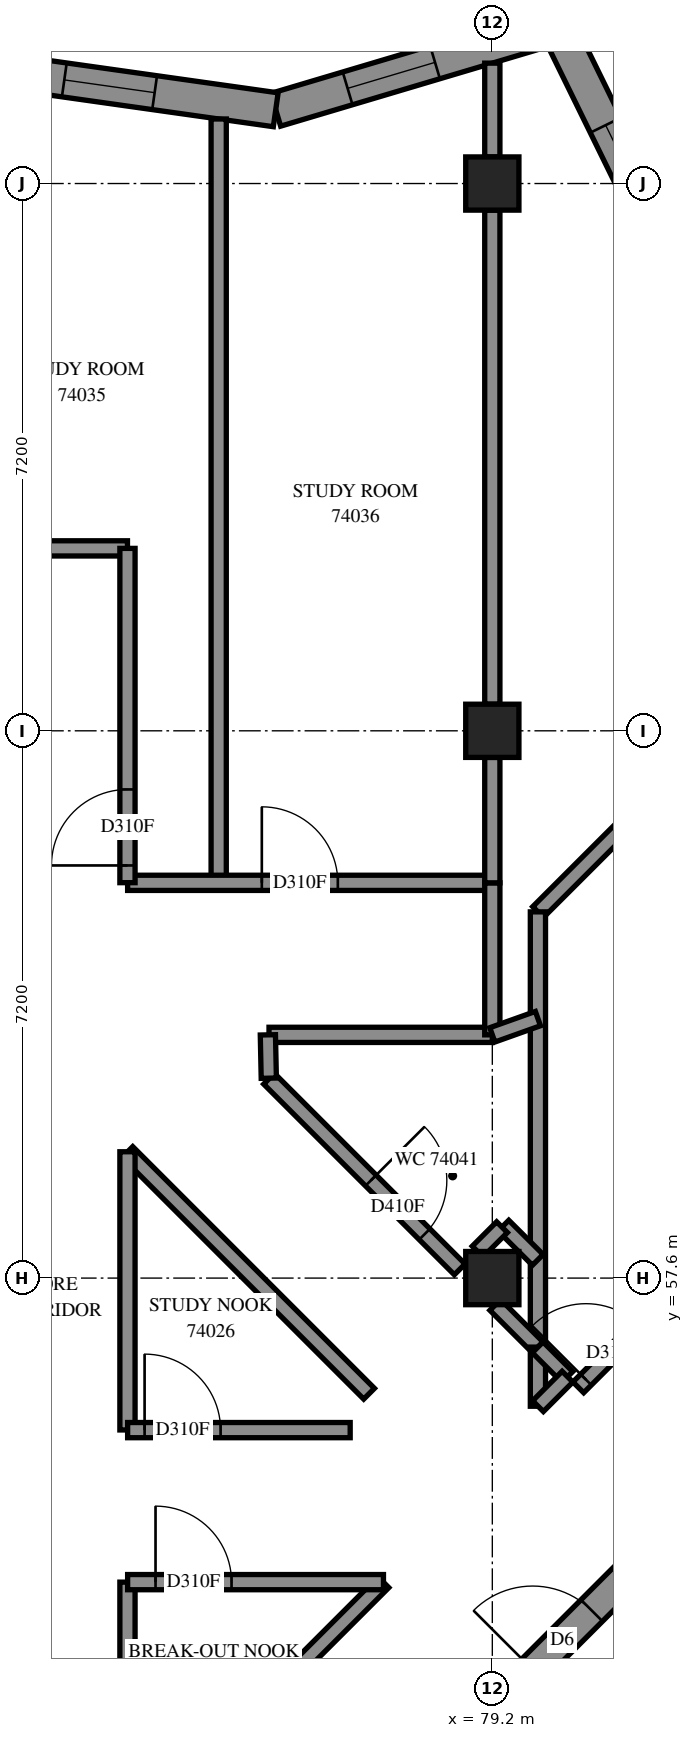
"""IFC4 building model, lengths in metres.
Left out: names, types, materials, properties, quantities, classifications, styles, units other than length and angle.
Written with IfcOpenShell. Run it as: python <this file> out.ifc"""

import sys

from ifc_helpers import new_model, si_unit, direction, frame, frame_2d, origin, origin_2d, place, context, subcontext, project, spatial, polyline, rectangle, outline, extrude, element, fill, save


model = new_model("IFC4")
c1 = context("Model", 3, precision=1e-05, world=origin(), true_north=direction((0.0, 1.0)))
c2 = subcontext(c1, "Body", "Model", "MODEL_VIEW")
j1 = project(units=[si_unit("LENGTHUNIT", "METRE"), si_unit("PLANEANGLEUNIT", "RADIAN")], contexts=[c1])
p1 = place(None, origin())
s1 = spatial("IfcSite", under=j1, at=p1, CompositionType="ELEMENT")
p2 = place(p1, origin())
s2 = spatial("IfcBuilding", under=s1, at=p2, CompositionType="ELEMENT")
p3 = place(p2, frame((0.0, 0.0, 271.0)))
s3 = spatial("IfcBuildingStorey", under=s2, at=p3, CompositionType="ELEMENT", Elevation=271.0)
for number, where, z_axis, x_axis in (
    (1, (79.2, 57.6, 0.0), (0.0, 0.0, 1.0), (1.0, 0.0, 0.0)),
    (2, (79.2, 64.8, 0.0), (0.0, 0.0, 1.0), (1.0, 0.0, 0.0)),
    (3, (79.2, 72.0, 0.0), (0.0, 0.0, 1.0), (1.0, 0.0, 0.0)),
):
    element("IfcColumn", number, at=place(p3, frame(where, z_axis=z_axis, x_axis=x_axis)), inside=s3, PredefinedType="COLUMN", context=c2, shape_type="SweptSolid", body=[
        extrude(rectangle(XDim=0.7, YDim=0.7, at=origin_2d()), origin(), (0.0, 0.0, 1.0), 3.1),
    ])
p4 = place(p3, frame((76.513, 49.231, -0.3), z_axis=(0.0, 0.0, 1.0), x_axis=(0.7071067812, 0.7071067812, 0.0)))
e4 = element("IfcWall", 4, at=p4, inside=s3, PredefinedType="SHEAR", context=c2, shape_type="SweptSolid", body=[
    extrude(rectangle(XDim=14.4, YDim=0.4, at=frame_2d((7.2, 0.0))), origin(), (0.0, 0.0, 1.0), 2.7),
])
p5 = place(p4, frame((4.55, 0.0, 0.3)))
e5 = element("IfcOpeningElement", 5, at=p5, cuts=e4, PredefinedType="OPENING", context=c2, shape_type="SweptSolid", body=[
    extrude(rectangle(XDim=1.1, YDim=2.1, at=frame_2d((0.55, 1.05))), frame((0.0, 0.21, 0.0), z_axis=(0.0, -1.0, 0.0), x_axis=(1.0, 0.0, 0.0)), (0.0, 0.0, 1.0), 0.42),
])
p6 = place(p4, frame((11.35, 0.0, 0.3)))
e6 = element("IfcOpeningElement", 6, at=p6, cuts=e4, PredefinedType="OPENING", context=c2, shape_type="SweptSolid", body=[
    extrude(rectangle(XDim=1.1, YDim=2.1, at=frame_2d((0.55, 1.05))), frame((0.0, 0.21, 0.0), z_axis=(0.0, -1.0, 0.0), x_axis=(1.0, 0.0, 0.0)), (0.0, 0.0, 1.0), 0.42),
])
p7 = place(p3, frame((81.545, 71.025, 0.0), z_axis=(0.0, 0.0, 1.0), x_axis=(-0.4400668213, 0.8979650287, 0.0)))
e7 = element("IfcWall", 7, at=p7, inside=s3, PredefinedType="SOLIDWALL", context=c2, shape_type="SweptSolid", body=[
    extrude(outline(polyline([(0.056, -0.225), (3.583, -0.225), (3.203, 0.225), (-0.056, 0.225), (0.056, -0.225)])), origin(), (0.0, 0.0, 1.0), 3.1),
])
p8 = place(p7, frame((0.741, 0.0, 0.45)))
e8 = element("IfcOpeningElement", 8, at=p8, cuts=e7, PredefinedType="OPENING", context=c2, shape_type="SweptSolid", body=[
    extrude(rectangle(XDim=1.2, YDim=2.55, at=frame_2d((0.6, 1.275))), frame((0.0, 0.235, 0.0), z_axis=(0.0, -1.0, 0.0), x_axis=(1.0, 0.0, 0.0)), (0.0, 0.0, 1.0), 0.47),
])
p9 = place(p3, frame((80.052, 74.072, 0.0), z_axis=(0.0, 0.0, 1.0), x_axis=(-0.9584412894, -0.2852898434, 0.0)))
e9 = element("IfcWall", 9, at=p9, inside=s3, PredefinedType="SOLIDWALL", context=c2, shape_type="SweptSolid", body=[
    extrude(outline(polyline([(-0.19, -0.225), (3.813, -0.225), (3.911, 0.225), (0.19, 0.225), (-0.19, -0.225)])), origin(), (0.0, 0.0, 1.0), 3.1),
])
p10 = place(p9, frame((1.675, 0.0, 0.45)))
e10 = element("IfcOpeningElement", 10, at=p10, cuts=e9, PredefinedType="OPENING", context=c2, shape_type="SweptSolid", body=[
    extrude(rectangle(XDim=1.2, YDim=2.55, at=frame_2d((0.6, 1.275))), frame((0.0, 0.235, 0.0), z_axis=(0.0, -1.0, 0.0), x_axis=(1.0, 0.0, 0.0)), (0.0, 0.0, 1.0), 0.47),
])
p11 = place(p3, frame((76.351, 72.97, 0.0), z_axis=(0.0, 0.0, 1.0), x_axis=(-0.9901651862, 0.1399031953, 0.0)))
e11 = element("IfcWall", 11, at=p11, inside=s3, PredefinedType="SOLIDWALL", context=c2, shape_type="SweptSolid", body=[
    extrude(outline(polyline([(0.049, -0.225), (3.924, -0.225), (3.86, 0.225), (-0.049, 0.225), (0.049, -0.225)])), origin(), (0.0, 0.0, 1.0), 3.1),
])
p12 = place(p11, frame((1.609, 0.0, 0.45)))
e12 = element("IfcOpeningElement", 12, at=p12, cuts=e11, PredefinedType="OPENING", context=c2, shape_type="SweptSolid", body=[
    extrude(rectangle(XDim=1.2, YDim=2.55, at=frame_2d((0.6, 1.275))), frame((0.0, 0.235, 0.0), z_axis=(0.0, -1.0, 0.0), x_axis=(1.0, 0.0, 0.0)), (0.0, 0.0, 1.0), 0.47),
])
p13 = place(p3, frame((55.2, 67.2, 0.0), z_axis=(0.0, 0.0, 1.0), x_axis=(1.0, 0.0, 0.0)))
e13 = element("IfcWall", 13, at=p13, inside=s3, PredefinedType="PARTITIONING", context=c2, shape_type="SweptSolid", body=[
    extrude(rectangle(XDim=19.2, YDim=0.2, at=frame_2d((9.6, 0.0))), origin(), (0.0, 0.0, 1.0), 3.1),
])
p14 = place(p13, frame((4.492, 0.0, 0.0)))
e14 = element("IfcOpeningElement", 14, at=p14, cuts=e13, PredefinedType="OPENING", context=c2, shape_type="SweptSolid", body=[
    extrude(rectangle(XDim=1.0, YDim=2.1, at=frame_2d((0.5, 1.05))), frame((0.0, 0.11, 0.0), z_axis=(0.0, -1.0, 0.0), x_axis=(1.0, 0.0, 0.0)), (0.0, 0.0, 1.0), 0.22),
])
p15 = place(p13, frame((6.567, 0.0, 0.0)))
e15 = element("IfcOpeningElement", 15, at=p15, cuts=e13, PredefinedType="OPENING", context=c2, shape_type="SweptSolid", body=[
    extrude(rectangle(XDim=1.0, YDim=2.1, at=frame_2d((0.5, 1.05))), frame((0.0, 0.11, 0.0), z_axis=(0.0, -1.0, 0.0), x_axis=(1.0, 0.0, 0.0)), (0.0, 0.0, 1.0), 0.22),
])
p16 = place(p13, frame((11.693, 0.0, 0.0)))
e16 = element("IfcOpeningElement", 16, at=p16, cuts=e13, PredefinedType="OPENING", context=c2, shape_type="SweptSolid", body=[
    extrude(rectangle(XDim=1.0, YDim=2.1, at=frame_2d((0.5, 1.05))), frame((0.0, 0.11, 0.0), z_axis=(0.0, -1.0, 0.0), x_axis=(1.0, 0.0, 0.0)), (0.0, 0.0, 1.0), 0.22),
])
p17 = place(p13, frame((13.88, 0.0, 0.0)))
e17 = element("IfcOpeningElement", 17, at=p17, cuts=e13, PredefinedType="OPENING", context=c2, shape_type="SweptSolid", body=[
    extrude(rectangle(XDim=1.0, YDim=2.1, at=frame_2d((0.5, 1.05))), frame((0.0, 0.11, 0.0), z_axis=(0.0, -1.0, 0.0), x_axis=(1.0, 0.0, 0.0)), (0.0, 0.0, 1.0), 0.22),
])
p18 = place(p3, frame((75.6, 62.8, 0.0), z_axis=(0.0, 0.0, 1.0), x_axis=(0.0, 1.0, 0.0)))
e18 = element("IfcWall", 18, at=p18, inside=s3, PredefinedType="PARTITIONING", context=c2, shape_type="SweptSolid", body=[
    extrude(rectangle(XDim=10.049, YDim=0.2, at=frame_2d((5.025, 0.0))), origin(), (0.0, 0.0, 1.0), 3.1),
])
p19 = place(p3, frame((80.332, 56.163, 0.0), z_axis=(0.0, 0.0, 1.0), x_axis=(0.7071067812, 0.7071067812, 0.0)))
e19 = element("IfcWall", 19, at=p19, inside=s3, PredefinedType="PARTITIONING", context=c2, shape_type="SweptSolid", body=[
    extrude(rectangle(XDim=9.198, YDim=0.2, at=frame_2d((4.599, 0.0))), origin(), (0.0, 0.0, 1.0), 3.1),
])
p20 = place(p19, frame((0.143, 0.0, 0.0)))
e20 = element("IfcOpeningElement", 20, at=p20, cuts=e19, PredefinedType="OPENING", context=c2, shape_type="SweptSolid", body=[
    extrude(rectangle(XDim=1.0, YDim=2.1, at=frame_2d((0.5, 1.05))), frame((0.0, 0.11, 0.0), z_axis=(0.0, -1.0, 0.0), x_axis=(1.0, 0.0, 0.0)), (0.0, 0.0, 1.0), 0.22),
])
p21 = place(p3, frame((79.2, 65.15, 0.0), z_axis=(0.0, 0.0, 1.0), x_axis=(0.0, 1.0, 0.0)))
e21 = element("IfcWall", 21, at=p21, inside=s3, PredefinedType="PARTITIONING", context=c2, shape_type="SweptSolid", body=[
    extrude(rectangle(XDim=6.5, YDim=0.2, at=frame_2d((3.25, 0.0))), origin(), (0.0, 0.0, 1.0), 3.1),
])
p22 = place(p3, frame((79.802, 62.416, 0.0), z_axis=(0.0, 0.0, 1.0), x_axis=(0.7072775181, 0.7069360031, 0.0)))
e22 = element("IfcWall", 22, at=p22, inside=s3, PredefinedType="PARTITIONING", context=c2, shape_type="SweptSolid", body=[
    extrude(rectangle(XDim=5.856, YDim=0.2, at=frame_2d((2.928, 0.0))), origin(), (0.0, 0.0, 1.0), 3.1),
])
p23 = place(p3, frame((79.8, 56.692, 0.0), z_axis=(0.0, 0.0, 1.0), x_axis=(0.0, 1.0, 0.0)))
e23 = element("IfcWall", 23, at=p23, inside=s3, PredefinedType="PARTITIONING", context=c2, shape_type="SweptSolid", body=[
    extrude(rectangle(XDim=5.726, YDim=0.2, at=frame_2d((2.863, 0.0))), origin(), (0.0, 0.0, 1.0), 3.1),
])
p24 = place(p3, frame((74.402, 62.8, 0.0), z_axis=(0.0, 0.0, 1.0), x_axis=(1.0, 0.0, 0.0)))
e24 = element("IfcWall", 24, at=p24, inside=s3, PredefinedType="PARTITIONING", context=c2, shape_type="SweptSolid", body=[
    extrude(rectangle(XDim=4.798, YDim=0.2, at=frame_2d((2.399, 0.0))), origin(), (0.0, 0.0, 1.0), 3.1),
])
p25 = place(p24, frame((1.766, 0.0, 0.0)))
e25 = element("IfcOpeningElement", 25, at=p25, cuts=e24, PredefinedType="OPENING", context=c2, shape_type="SweptSolid", body=[
    extrude(rectangle(XDim=1.0, YDim=2.1, at=frame_2d((0.5, 1.05))), frame((0.0, 0.11, 0.0), z_axis=(0.0, -1.0, 0.0), x_axis=(1.0, 0.0, 0.0)), (0.0, 0.0, 1.0), 0.22),
])
p26 = place(p3, frame((74.401, 50.233, 0.0), z_axis=(0.0, 0.0, 1.0), x_axis=(0.7071067812, 0.7071067812, 0.0)))
e26 = element("IfcWall", 26, at=p26, inside=s3, PredefinedType="PARTITIONING", context=c2, shape_type="SweptSolid", body=[
    extrude(rectangle(XDim=4.76, YDim=0.2, at=frame_2d((2.38, 0.0))), origin(), (0.0, 0.0, 1.0), 3.1),
])
p27 = place(p3, frame((74.399, 59.259, 0.0), z_axis=(0.0, 0.0, 1.0), x_axis=(0.7071067812, -0.7071067812, 0.0)))
e27 = element("IfcWall", 27, at=p27, inside=s3, PredefinedType="PARTITIONING", context=c2, shape_type="SweptSolid", body=[
    extrude(rectangle(XDim=4.497, YDim=0.2, at=frame_2d((2.249, 0.0))), origin(), (0.0, 0.0, 1.0), 3.1),
])
p28 = place(p3, frame((74.4, 62.802, 0.0), z_axis=(0.0, 0.0, 1.0), x_axis=(0.0, 1.0, 0.0)))
e28 = element("IfcWall", 28, at=p28, inside=s3, PredefinedType="PARTITIONING", context=c2, shape_type="SweptSolid", body=[
    extrude(rectangle(XDim=4.398, YDim=0.2, at=frame_2d((2.199, 0.0))), origin(), (0.0, 0.0, 1.0), 3.1),
])
p29 = place(p28, frame((0.227, 0.0, 0.0)))
e29 = element("IfcOpeningElement", 29, at=p29, cuts=e28, PredefinedType="OPENING", context=c2, shape_type="SweptSolid", body=[
    extrude(rectangle(XDim=1.0, YDim=2.1, at=frame_2d((0.5, 1.05))), frame((0.0, 0.11, 0.0), z_axis=(0.0, -1.0, 0.0), x_axis=(1.0, 0.0, 0.0)), (0.0, 0.0, 1.0), 0.22),
])
p30 = place(p3, frame((74.4, 55.602, 0.0), z_axis=(0.0, 0.0, 1.0), x_axis=(0.0, 1.0, 0.0)))
e30 = element("IfcWall", 30, at=p30, inside=s3, PredefinedType="PARTITIONING", context=c2, shape_type="SweptSolid", body=[
    extrude(rectangle(XDim=3.66, YDim=0.2, at=frame_2d((1.83, 0.0))), origin(), (0.0, 0.0, 1.0), 3.1),
])
p31 = place(p3, frame((76.263, 60.223, 0.0), z_axis=(0.0, 0.0, 1.0), x_axis=(0.7071067812, -0.7071067812, 0.0)))
e31 = element("IfcWall", 31, at=p31, inside=s3, PredefinedType="PARTITIONING", context=c2, shape_type="SweptSolid", body=[
    extrude(rectangle(XDim=3.547, YDim=0.2, at=frame_2d((1.773, 0.0))), origin(), (0.0, 0.0, 1.0), 3.1),
])
p32 = place(p31, frame((1.893, 0.0, 0.0)))
e32 = element("IfcOpeningElement", 32, at=p32, cuts=e31, PredefinedType="OPENING", context=c2, shape_type="SweptSolid", body=[
    extrude(rectangle(XDim=1.0, YDim=2.1, at=frame_2d((0.5, 1.05))), frame((0.0, 0.11, 0.0), z_axis=(0.0, -1.0, 0.0), x_axis=(1.0, 0.0, 0.0)), (0.0, 0.0, 1.0), 0.22),
])
p33 = place(p3, frame((74.4, 50.232, 0.0), z_axis=(0.0, 0.0, 1.0), x_axis=(0.0, 1.0, 0.0)))
e33 = element("IfcWall", 33, at=p33, inside=s3, PredefinedType="PARTITIONING", context=c2, shape_type="SweptSolid", body=[
    extrude(rectangle(XDim=3.368, YDim=0.2, at=frame_2d((1.684, 0.0))), origin(), (0.0, 0.0, 1.0), 3.1),
])
p34 = place(p3, frame((74.402, 53.6, 0.0), z_axis=(0.0, 0.0, 1.0), x_axis=(1.0, 0.0, 0.0)))
e34 = element("IfcWall", 34, at=p34, inside=s3, PredefinedType="PARTITIONING", context=c2, shape_type="SweptSolid", body=[
    extrude(rectangle(XDim=3.366, YDim=0.2, at=frame_2d((1.683, 0.0))), origin(), (0.0, 0.0, 1.0), 3.1),
])
p35 = place(p34, frame((0.367, 0.0, 0.0)))
e35 = element("IfcOpeningElement", 35, at=p35, cuts=e34, PredefinedType="OPENING", context=c2, shape_type="SweptSolid", body=[
    extrude(rectangle(XDim=1.0, YDim=2.1, at=frame_2d((0.5, 1.05))), frame((0.0, 0.11, 0.0), z_axis=(0.0, -1.0, 0.0), x_axis=(1.0, 0.0, 0.0)), (0.0, 0.0, 1.0), 0.22),
])
p36 = place(p3, frame((76.262, 60.8, 0.0), z_axis=(0.0, 0.0, 1.0), x_axis=(1.0, 0.0, 0.0)))
e36 = element("IfcWall", 36, at=p36, inside=s3, PredefinedType="PARTITIONING", context=c2, shape_type="SweptSolid", body=[
    extrude(rectangle(XDim=2.938, YDim=0.2, at=frame_2d((1.469, 0.0))), origin(), (0.0, 0.0, 1.0), 3.1),
])
p37 = place(p3, frame((74.402, 55.6, 0.0), z_axis=(0.0, 0.0, 1.0), x_axis=(1.0, 0.0, 0.0)))
e37 = element("IfcWall", 37, at=p37, inside=s3, PredefinedType="PARTITIONING", context=c2, shape_type="SweptSolid", body=[
    extrude(rectangle(XDim=2.928, YDim=0.2, at=frame_2d((1.464, 0.0))), origin(), (0.0, 0.0, 1.0), 3.1),
])
p38 = place(p37, frame((0.223, 0.0, 0.0)))
e38 = element("IfcOpeningElement", 38, at=p38, cuts=e37, PredefinedType="OPENING", context=c2, shape_type="SweptSolid", body=[
    extrude(rectangle(XDim=1.0, YDim=2.1, at=frame_2d((0.5, 1.05))), frame((0.0, 0.11, 0.0), z_axis=(0.0, -1.0, 0.0), x_axis=(1.0, 0.0, 0.0)), (0.0, 0.0, 1.0), 0.22),
])
p39 = place(p3, frame((79.2, 60.8, 0.0), z_axis=(0.0, 0.0, 1.0), x_axis=(0.0, 1.0, 0.0)))
e39 = element("IfcWall", 39, at=p39, inside=s3, PredefinedType="PARTITIONING", context=c2, shape_type="SweptSolid", body=[
    extrude(rectangle(XDim=2.0, YDim=0.2, at=frame_2d((1.0, 0.0))), origin(), (0.0, 0.0, 1.0), 3.1),
])
p40 = place(p3, frame((79.2, 62.8, 0.0), z_axis=(0.0, 0.0, 1.0), x_axis=(0.0, 1.0, 0.0)))
e40 = element("IfcWall", 40, at=p40, inside=s3, PredefinedType="PARTITIONING", context=c2, shape_type="SweptSolid", body=[
    extrude(rectangle(XDim=1.65, YDim=0.2, at=frame_2d((0.825, 0.0))), origin(), (0.0, 0.0, 1.0), 3.1),
])
p41 = place(p3, frame((79.2, 72.35, 0.0), z_axis=(0.0, 0.0, 1.0), x_axis=(0.0, 1.0, 0.0)))
e41 = element("IfcWall", 41, at=p41, inside=s3, PredefinedType="PARTITIONING", context=c2, shape_type="SweptSolid", body=[
    extrude(rectangle(XDim=1.234, YDim=0.2, at=frame_2d((0.617, 0.0))), origin(), (0.0, 0.0, 1.0), 3.1),
])
p42 = place(p3, frame((79.239, 57.247, 0.0), z_axis=(0.0, 0.0, 1.0), x_axis=(0.7071067812, -0.7071067812, 0.0)))
e42 = element("IfcWall", 42, at=p42, inside=s3, PredefinedType="PARTITIONING", context=c2, shape_type="SweptSolid", body=[
    extrude(rectangle(XDim=0.789, YDim=0.2, at=frame_2d((0.395, 0.0))), origin(), (0.0, 0.0, 1.0), 3.1),
])
p43 = place(p3, frame((79.8, 55.914, 0.0), z_axis=(0.0, 0.0, 1.0), x_axis=(0.0, 1.0, 0.0)))
e43 = element("IfcWall", 43, at=p43, inside=s3, PredefinedType="PARTITIONING", context=c2, shape_type="SweptSolid", body=[
    extrude(rectangle(XDim=0.778, YDim=0.2, at=frame_2d((0.389, 0.0))), origin(), (0.0, 0.0, 1.0), 3.1),
])
p44 = place(p3, frame((79.346, 58.29, 0.0), z_axis=(0.0, 0.0, 1.0), x_axis=(0.7086729034, -0.7055371826, 0.0)))
e44 = element("IfcWall", 44, at=p44, inside=s3, PredefinedType="PARTITIONING", context=c2, shape_type="SweptSolid", body=[
    extrude(rectangle(XDim=0.638, YDim=0.2, at=frame_2d((0.319, 0.0))), origin(), (0.0, 0.0, 1.0), 3.1),
])
p45 = place(p3, frame((79.2, 60.8, 0.0), z_axis=(0.0, 0.0, 1.0), x_axis=(0.9418838915, 0.335938588, 0.0)))
e45 = element("IfcWall", 45, at=p45, inside=s3, PredefinedType="PARTITIONING", context=c2, shape_type="SweptSolid", body=[
    extrude(rectangle(XDim=0.637, YDim=0.2, at=frame_2d((0.319, 0.0))), origin(), (0.0, 0.0, 1.0), 3.1),
])
p46 = place(p3, frame((76.247, 60.8, 0.0), z_axis=(0.0, 0.0, 1.0), x_axis=(0.0210479677, -0.999778467, 0.0)))
e46 = element("IfcWall", 46, at=p46, inside=s3, PredefinedType="PARTITIONING", context=c2, shape_type="SweptSolid", body=[
    extrude(rectangle(XDim=0.57, YDim=0.2, at=frame_2d((0.285, 0.0))), origin(), (0.0, 0.0, 1.0), 3.1),
])
p47 = place(p3, frame((79.797, 56.689, 0.0), z_axis=(0.0, 0.0, 1.0), x_axis=(0.7071067812, -0.7071067812, 0.0)))
e47 = element("IfcWall", 47, at=p47, inside=s3, PredefinedType="PARTITIONING", context=c2, shape_type="SweptSolid", body=[
    extrude(rectangle(XDim=0.551, YDim=0.2, at=frame_2d((0.276, 0.0))), origin(), (0.0, 0.0, 1.0), 3.1),
])
p48 = place(p3, frame((79.801, 55.915, 0.0), z_axis=(0.0, 0.0, 1.0), x_axis=(0.7071067812, 0.7071067812, 0.0)))
e48 = element("IfcWall", 48, at=p48, inside=s3, PredefinedType="PARTITIONING", context=c2, shape_type="SweptSolid", body=[
    extrude(rectangle(XDim=0.549, YDim=0.2, at=frame_2d((0.274, 0.0))), origin(), (0.0, 0.0, 1.0), 3.1),
])
p49 = place(p3, frame((79.007, 57.949, 0.0), z_axis=(0.0, 0.0, 1.0), x_axis=(0.7071067812, 0.7071067812, 0.0)))
e49 = element("IfcWall", 49, at=p49, inside=s3, PredefinedType="PARTITIONING", context=c2, shape_type="SweptSolid", body=[
    extrude(rectangle(XDim=0.454, YDim=0.2, at=frame_2d((0.227, 0.0))), origin(), (0.0, 0.0, 1.0), 3.1),
])
p50 = place(p8, origin())
e50 = element("IfcWindow", 50, at=p50, inside=s3, PartitioningType="SINGLE_PANEL", PredefinedType="WINDOW", context=c2, shape_type="SweptSolid", body=[
    extrude(rectangle(XDim=1.2, YDim=2.55, at=frame_2d((0.6, 1.275))), frame((0.0, 0.205, 0.0), z_axis=(0.0, -1.0, 0.0), x_axis=(1.0, 0.0, 0.0)), (0.0, 0.0, 1.0), 0.06),
])
fill(e8, e50)
p51 = place(p10, origin())
e51 = element("IfcWindow", 51, at=p51, inside=s3, PartitioningType="SINGLE_PANEL", PredefinedType="WINDOW", context=c2, shape_type="SweptSolid", body=[
    extrude(rectangle(XDim=1.2, YDim=2.55, at=frame_2d((0.6, 1.275))), frame((0.0, 0.205, 0.0), z_axis=(0.0, -1.0, 0.0), x_axis=(1.0, 0.0, 0.0)), (0.0, 0.0, 1.0), 0.06),
])
fill(e10, e51)
p52 = place(p12, origin())
e52 = element("IfcWindow", 52, at=p52, inside=s3, PartitioningType="SINGLE_PANEL", PredefinedType="WINDOW", context=c2, shape_type="SweptSolid", body=[
    extrude(rectangle(XDim=1.2, YDim=2.55, at=frame_2d((0.6, 1.275))), frame((0.0, 0.205, 0.0), z_axis=(0.0, -1.0, 0.0), x_axis=(1.0, 0.0, 0.0)), (0.0, 0.0, 1.0), 0.06),
])
fill(e12, e52)
p53 = place(p5, origin())
e53 = element("IfcDoor", 53, at=p53, inside=s3, OperationType="DOUBLE_DOOR_SINGLE_SWING", PredefinedType="DOOR", context=c2, shape_type="SweptSolid", body=[
    extrude(rectangle(XDim=1.1, YDim=2.1, at=frame_2d((0.55, 1.05))), frame((0.0, 0.025, 0.0), z_axis=(0.0, -1.0, 0.0), x_axis=(1.0, 0.0, 0.0)), (0.0, 0.0, 1.0), 0.05),
])
fill(e5, e53)
p54 = place(p35, origin())
e54 = element("IfcDoor", 54, at=p54, inside=s3, OperationType="SINGLE_SWING_RIGHT", PredefinedType="DOOR", context=c2, shape_type="SweptSolid", body=[
    extrude(rectangle(XDim=1.0, YDim=2.1, at=frame_2d((0.5, 1.05))), frame((0.0, 0.025, 0.0), z_axis=(0.0, -1.0, 0.0), x_axis=(1.0, 0.0, 0.0)), (0.0, 0.0, 1.0), 0.05),
])
fill(e35, e54)
p55 = place(p38, origin())
e55 = element("IfcDoor", 55, at=p55, inside=s3, OperationType="SINGLE_SWING_LEFT", PredefinedType="DOOR", context=c2, shape_type="SweptSolid", body=[
    extrude(rectangle(XDim=1.0, YDim=2.1, at=frame_2d((0.5, 1.05))), frame((0.0, 0.025, 0.0), z_axis=(0.0, -1.0, 0.0), x_axis=(1.0, 0.0, 0.0)), (0.0, 0.0, 1.0), 0.05),
])
fill(e38, e55)
p56 = place(p29, origin())
e56 = element("IfcDoor", 56, at=p56, inside=s3, OperationType="SINGLE_SWING_RIGHT", PredefinedType="DOOR", context=c2, shape_type="SweptSolid", body=[
    extrude(rectangle(XDim=1.0, YDim=2.1, at=frame_2d((0.5, 1.05))), frame((0.0, 0.025, 0.0), z_axis=(0.0, -1.0, 0.0), x_axis=(1.0, 0.0, 0.0)), (0.0, 0.0, 1.0), 0.05),
])
fill(e29, e56)
p57 = place(p25, origin())
e57 = element("IfcDoor", 57, at=p57, inside=s3, OperationType="SINGLE_SWING_LEFT", PredefinedType="DOOR", context=c2, shape_type="SweptSolid", body=[
    extrude(rectangle(XDim=1.0, YDim=2.1, at=frame_2d((0.5, 1.05))), frame((0.0, 0.025, 0.0), z_axis=(0.0, -1.0, 0.0), x_axis=(1.0, 0.0, 0.0)), (0.0, 0.0, 1.0), 0.05),
])
fill(e25, e57)
p58 = place(p32, origin())
e58 = element("IfcDoor", 58, at=p58, inside=s3, OperationType="SINGLE_SWING_LEFT", PredefinedType="DOOR", context=c2, shape_type="SweptSolid", body=[
    extrude(rectangle(XDim=1.0, YDim=2.1, at=frame_2d((0.5, 1.05))), frame((0.0, 0.025, 0.0), z_axis=(0.0, -1.0, 0.0), x_axis=(1.0, 0.0, 0.0)), (0.0, 0.0, 1.0), 0.05),
])
fill(e32, e58)
p59 = place(p20, origin())
e59 = element("IfcDoor", 59, at=p59, inside=s3, OperationType="SINGLE_SWING_LEFT", PredefinedType="DOOR", context=c2, shape_type="SweptSolid", body=[
    extrude(rectangle(XDim=1.0, YDim=2.1, at=frame_2d((0.5, 1.05))), frame((0.0, 0.025, 0.0), z_axis=(0.0, -1.0, 0.0), x_axis=(1.0, 0.0, 0.0)), (0.0, 0.0, 1.0), 0.05),
])
fill(e20, e59)
save(model, sys.argv[1])
